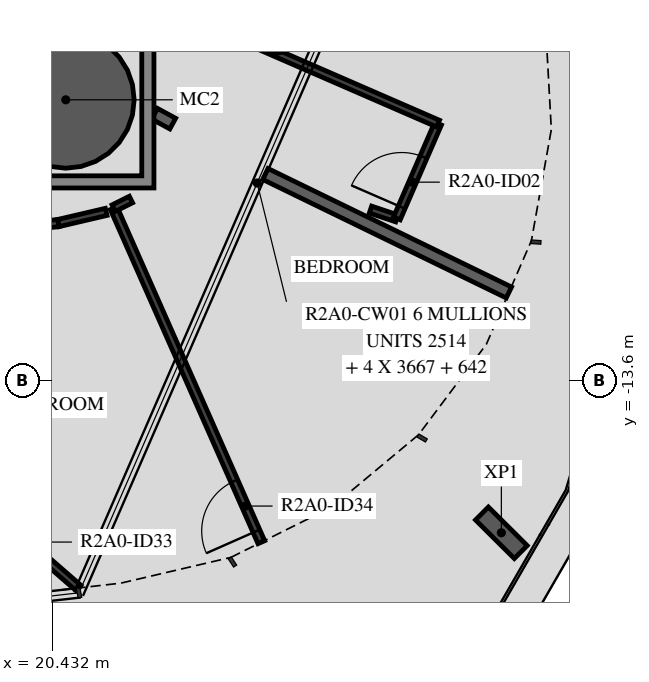
"""IFC4 building model, lengths in metres.
Left out: names, types, materials, properties, quantities, classifications, styles, units other than length and angle.
Written with IfcOpenShell. Run it as: python <this file> out.ifc"""

import sys

from ifc_helpers import new_model, si_unit, direction, frame, frame_2d, origin, origin_2d, place, context, subcontext, project, spatial, polyline, rectangle, hollow_circle, i_section, outline, extrude, element, fill, save


model = new_model("IFC4")
c1 = context("Model", 3, precision=1e-05, world=origin(), true_north=direction((0.0, 1.0)))
c2 = subcontext(c1, "Body", "Model", "MODEL_VIEW")
j1 = project(units=[si_unit("LENGTHUNIT", "METRE"), si_unit("PLANEANGLEUNIT", "RADIAN")], contexts=[c1])
p1 = place(None, origin())
s1 = spatial("IfcSite", under=j1, at=p1, CompositionType="ELEMENT")
p2 = place(p1, origin())
s2 = spatial("IfcBuilding", under=s1, at=p2, CompositionType="ELEMENT")
p3 = place(p2, frame((0.0, 0.0, 76.7)))
s3 = spatial("IfcBuildingStorey", under=s2, at=p3, CompositionType="ELEMENT", Elevation=76.7)
p4 = place(p3, frame((20.648, -8.978, -0.45), z_axis=(0.0, 0.0, 1.0), x_axis=(1.0, 0.0, 0.0)))
e1 = element("IfcColumn", 1, at=p4, inside=s3, PredefinedType="COLUMN", context=c2, shape_type="SweptSolid", body=[
    extrude(hollow_circle(Radius=1.125, WallThickness=0.055, at=origin_2d()), origin(), (0.0, 0.0, 1.0), 3.57),
])
p5 = place(p3, frame((27.811, -16.098, -0.45), z_axis=(0.0, 0.0, 1.0), x_axis=(-0.704963041271, -0.709244041527, 0.0)))
e2 = element("IfcColumn", 2, at=p5, inside=s3, PredefinedType="COLUMN", context=c2, shape_type="SweptSolid", body=[
    extrude(i_section(OverallWidth=0.3, OverallDepth=0.9, WebThickness=0.019, FlangeThickness=0.035, FilletRadius=0.03, at=origin_2d()), origin(), (0.0, 0.0, 1.0), 3.57),
])
p6 = place(p3, frame((22.108, -9.207, 0.0), z_axis=(0.0, 0.0, 1.0), x_axis=(0.878251516807, -0.478198989151, 0.0)))
e3 = element("IfcWall", 3, at=p6, inside=s3, PredefinedType="STANDARD", context=c2, shape_type="SweptSolid", body=[
    extrude(rectangle(XDim=0.341, YDim=0.2, at=frame_2d((0.17, 0.0))), origin(), (0.0, 0.0, 1.0), 3.12),
])
p7 = place(p3, frame((23.929, -10.198, 0.0), z_axis=(0.0, 0.0, 1.0), x_axis=(0.899252572086, -0.437429779046, 0.0)))
e4 = element("IfcWall", 4, at=p7, inside=s3, PredefinedType="STANDARD", context=c2, shape_type="SweptSolid", body=[
    extrude(rectangle(XDim=4.454, YDim=0.2, at=frame_2d((2.227, 0.0))), origin(), (0.0, 0.0, 1.0), 3.12),
])
p8 = place(p3, frame((25.659, -10.783, 0.0), z_axis=(0.0, 0.0, 1.0), x_axis=(0.948362418423, -0.317188781837, 0.0)))
e5 = element("IfcWall", 5, at=p8, inside=s3, PredefinedType="PARTITIONING", context=c2, shape_type="SweptSolid", body=[
    extrude(rectangle(XDim=0.457, YDim=0.12, at=frame_2d((0.229, 0.0))), origin(), (0.0, 0.0, 1.0), 3.12),
])
p9 = place(p3, frame((26.092, -10.928, 0.0), z_axis=(0.0, 0.0, 1.0), x_axis=(0.398783871208, 0.917044941137, 0.0)))
e6 = element("IfcWall", 6, at=p9, inside=s3, PredefinedType="PARTITIONING", context=c2, shape_type="SweptSolid", body=[
    extrude(rectangle(XDim=1.7, YDim=0.12, at=frame_2d((0.85, 0.0))), origin(), (0.0, 0.0, 1.0), 3.12),
])
p10 = place(p9, frame((0.2, 0.0, 0.0)))
e7 = element("IfcOpeningElement", 7, at=p10, cuts=e6, PredefinedType="OPENING", context=c2, shape_type="SweptSolid", body=[
    extrude(rectangle(XDim=0.9, YDim=2.1, at=frame_2d((0.45, 1.05))), frame((0.0, 0.07, 0.0), z_axis=(0.0, -1.0, 0.0), x_axis=(1.0, 0.0, 0.0)), (0.0, 0.0, 1.0), 0.14),
])
p11 = place(p3, frame((26.77, -9.369, 0.0), z_axis=(0.0, 0.0, 1.0), x_axis=(-0.917058488031, 0.39875271727, 0.0)))
e8 = element("IfcWall", 8, at=p11, inside=s3, PredefinedType="PARTITIONING", context=c2, shape_type="SweptSolid", body=[
    extrude(rectangle(XDim=13.086, YDim=0.12, at=frame_2d((6.543, 0.0))), origin(), (0.0, 0.0, 1.0), 3.12),
])
p12 = place(p11, frame((6.889, 0.0, 0.0)))
e9 = element("IfcOpeningElement", 9, at=p12, cuts=e8, PredefinedType="OPENING", context=c2, shape_type="SweptSolid", body=[
    extrude(rectangle(XDim=0.8, YDim=2.1, at=frame_2d((0.4, 1.05))), frame((0.0, 0.07, 0.0), z_axis=(0.0, -1.0, 0.0), x_axis=(1.0, 0.0, 0.0)), (0.0, 0.0, 1.0), 0.14),
])
p13 = place(p11, frame((9.358, 0.0, 0.0)))
e10 = element("IfcOpeningElement", 10, at=p13, cuts=e8, PredefinedType="OPENING", context=c2, shape_type="SweptSolid", body=[
    extrude(rectangle(XDim=0.9, YDim=2.1, at=frame_2d((0.45, 1.05))), frame((0.0, 0.07, 0.0), z_axis=(0.0, -1.0, 0.0), x_axis=(1.0, 0.0, 0.0)), (0.0, 0.0, 1.0), 0.14),
])
p14 = place(p3, frame((23.93, -7.573, 0.0), z_axis=(0.0, 0.0, 1.0), x_axis=(0.28441027407, -0.958702662979, 0.0)))
e11 = element("IfcWall", 11, at=p14, inside=s3, PredefinedType="PARTITIONING", context=c2, shape_type="SweptSolid", body=[
    extrude(rectangle(XDim=0.671, YDim=0.12, at=frame_2d((0.336, 0.0))), origin(), (0.0, 0.0, 1.0), 3.12),
])
p15 = place(p3, frame((20.856, -17.006, 0.0), z_axis=(0.0, 0.0, 1.0), x_axis=(-0.75423134567, 0.656608770281, 0.0)))
e12 = element("IfcWall", 12, at=p15, inside=s3, PredefinedType="PARTITIONING", context=c2, shape_type="SweptSolid", body=[
    extrude(rectangle(XDim=7.995, YDim=0.12, at=frame_2d((3.998, 0.0))), origin(), (0.0, 0.0, 1.0), 3.12),
])
p16 = place(p15, frame((0.7, 0.0, 0.0)))
e13 = element("IfcOpeningElement", 13, at=p16, cuts=e12, PredefinedType="OPENING", context=c2, shape_type="SweptSolid", body=[
    extrude(rectangle(XDim=0.9, YDim=2.1, at=frame_2d((0.45, 1.05))), frame((0.0, 0.07, 0.0), z_axis=(0.0, -1.0, 0.0), x_axis=(1.0, 0.0, 0.0)), (0.0, 0.0, 1.0), 0.14),
])
p17 = place(p3, frame((20.527, -11.004, 0.0), z_axis=(0.0, 0.0, 1.0), x_axis=(-0.993568869194, -0.113229422712, 0.0)))
e14 = element("IfcWall", 14, at=p17, inside=s3, PredefinedType="PARTITIONING", context=c2, shape_type="SweptSolid", body=[
    extrude(rectangle(XDim=5.688, YDim=0.12, at=frame_2d((2.844, 0.0))), origin(), (0.0, 0.0, 1.0), 3.12),
])
p18 = place(p3, frame((21.312, -10.821, 0.0), z_axis=(0.0, 0.0, 1.0), x_axis=(-0.973765266404, -0.227554841621, 0.0)))
e15 = element("IfcWall", 15, at=p18, inside=s3, PredefinedType="PARTITIONING", context=c2, shape_type="SweptSolid", body=[
    extrude(rectangle(XDim=0.807, YDim=0.12, at=frame_2d((0.403, 0.0))), origin(), (0.0, 0.0, 1.0), 3.12),
])
p19 = place(p3, frame((23.864, -16.253, 0.0), z_axis=(0.0, 0.0, 1.0), x_axis=(-0.404274566917, 0.914637673915, 0.0)))
e16 = element("IfcWall", 16, at=p19, inside=s3, PredefinedType="PARTITIONING", context=c2, shape_type="SweptSolid", body=[
    extrude(rectangle(XDim=6.006, YDim=0.12, at=frame_2d((3.003, 0.0))), origin(), (0.0, 0.0, 1.0), 3.12),
])
p20 = place(p19, frame((0.2, 0.0, 0.0)))
e17 = element("IfcOpeningElement", 17, at=p20, cuts=e16, PredefinedType="OPENING", context=c2, shape_type="SweptSolid", body=[
    extrude(rectangle(XDim=0.9, YDim=2.1, at=frame_2d((0.45, 1.05))), frame((0.0, 0.07, 0.0), z_axis=(0.0, -1.0, 0.0), x_axis=(1.0, 0.0, 0.0)), (0.0, 0.0, 1.0), 0.14),
])
p21 = place(p3, frame((21.435, -10.76, 0.0), z_axis=(0.0, 0.0, 1.0), x_axis=(0.895041493646, 0.445982874841, 0.0)))
e18 = element("IfcWall", 18, at=p21, inside=s3, PredefinedType="PARTITIONING", context=c2, shape_type="SweptSolid", body=[
    extrude(rectangle(XDim=0.317, YDim=0.12, at=frame_2d((0.159, 0.0))), origin(), (0.0, 0.0, 1.0), 3.12),
])
p22 = place(p3, origin())
e19 = element("IfcWall", 19, at=p22, inside=s3, PredefinedType="STANDARD", context=c2, shape_type="SweptSolid", body=[
    extrude(outline(polyline([(22.098, -7.528), (22.098, -10.428), (19.198, -10.428), (19.198, -7.528), (22.098, -7.528)]), holes=[polyline([(19.398, -10.228), (21.898, -10.228), (21.898, -7.728), (19.398, -7.728), (19.398, -10.228)])]), origin(), (0.0, 0.0, 1.0), 3.12),
])
p23 = place(p10, origin())
e20 = element("IfcDoor", 20, at=p23, inside=s3, OperationType="SINGLE_SWING_LEFT", PredefinedType="DOOR", context=c2, shape_type="SweptSolid", body=[
    extrude(rectangle(XDim=0.9, YDim=2.1, at=frame_2d((0.45, 1.05))), frame((0.0, 0.025, 0.0), z_axis=(0.0, -1.0, 0.0), x_axis=(1.0, 0.0, 0.0)), (0.0, 0.0, 1.0), 0.05),
])
fill(e7, e20)
p24 = place(p20, origin())
e21 = element("IfcDoor", 21, at=p24, inside=s3, OperationType="SINGLE_SWING_RIGHT", PredefinedType="DOOR", context=c2, shape_type="SweptSolid", body=[
    extrude(rectangle(XDim=0.9, YDim=2.1, at=frame_2d((0.45, 1.05))), frame((0.0, 0.025, 0.0), z_axis=(0.0, -1.0, 0.0), x_axis=(1.0, 0.0, 0.0)), (0.0, 0.0, 1.0), 0.05),
])
fill(e17, e21)
save(model, sys.argv[1])
